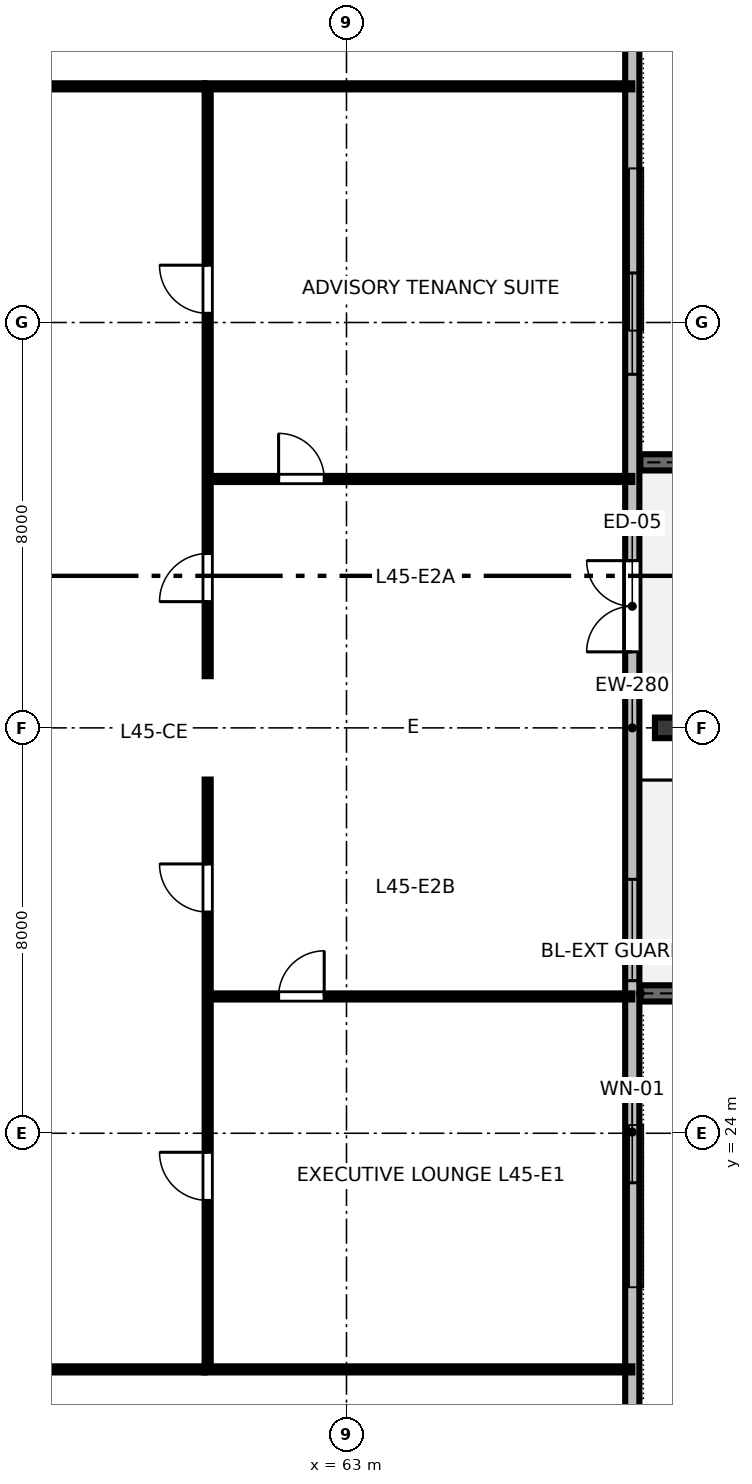
"""IFC4 building model, lengths in metres.
Left out: names, types, materials, properties, quantities, classifications, styles, units other than length and angle.
Written with IfcOpenShell. Run it as: python <this file> out.ifc"""

import sys

from ifc_helpers import new_model, si_unit, direction, frame, frame_2d, origin, origin_2d, place, context, subcontext, project, spatial, rectangle, i_section, extrude, element, fill, save


model = new_model("IFC4")
c1 = context("Model", 3, precision=1e-05, world=origin(), true_north=direction((0.0, 1.0)))
c2 = subcontext(c1, "Body", "Model", "MODEL_VIEW")
j1 = project(units=[si_unit("LENGTHUNIT", "METRE"), si_unit("PLANEANGLEUNIT", "RADIAN")], contexts=[c1])
p1 = place(None, origin())
s1 = spatial("IfcSite", under=j1, at=p1, CompositionType="ELEMENT")
p2 = place(p1, origin())
s2 = spatial("IfcBuilding", under=s1, at=p2, CompositionType="ELEMENT")
p3 = place(p2, frame((0.0, 0.0, 172.0)))
s3 = spatial("IfcBuildingStorey", under=s2, at=p3, CompositionType="ELEMENT", Elevation=172.0)
for number, where, z_axis, x_axis in (
    (1, (68.8, 26.76, 0.0), (0.0, 0.0, 1.0), (1.0, 0.0, 0.0)),
    (2, (68.8, 37.24, 0.0), (0.0, 0.0, 1.0), (1.0, 0.0, 0.0)),
):
    element("IfcWall", number, at=place(p3, frame(where, z_axis=z_axis, x_axis=x_axis)), inside=s3, PredefinedType="SHEAR", context=c2, shape_type="SweptSolid", body=[
        extrude(rectangle(XDim=4.5, YDim=0.32, at=frame_2d((2.25, 0.0))), origin(), (0.0, 0.0, 1.0), 1.55),
    ])
p4 = place(p3, frame((69.3, 32.0, 0.0), z_axis=(-0.054564800483, 0.0, 0.998510231569), x_axis=(0.998510231569, 0.0, 0.054564800483)))
e3 = element("IfcColumn", 3, at=p4, inside=s3, PredefinedType="COLUMN", context=c2, shape_type="SweptSolid", body=[
    extrude(i_section(OverallWidth=0.406, OverallDepth=0.425, WebThickness=0.033, FlangeThickness=0.052, FilletRadius=0.025, at=origin_2d()), origin(), (0.0, 0.0, 1.0), 4.765),
])
p5 = place(p3, frame((68.64, 16.94, 0.0), z_axis=(0.0, 0.0, 1.0), x_axis=(0.0, 1.0, 0.0)))
e4 = element("IfcWall", 4, at=p5, inside=s3, PredefinedType="STANDARD", context=c2, shape_type="SweptSolid", body=[
    extrude(rectangle(XDim=30.12, YDim=0.28, at=frame_2d((15.06, 0.0))), origin(), (0.0, 0.0, 1.0), 4.76),
])
p6 = place(p5, frame((16.56, 0.0, 0.0)))
e5 = element("IfcOpeningElement", 5, at=p6, cuts=e4, PredefinedType="OPENING", context=c2, shape_type="SweptSolid", body=[
    extrude(rectangle(XDim=1.8, YDim=2.2, at=frame_2d((0.9, 1.1))), frame((0.0, 0.15, 0.0), z_axis=(0.0, -1.0, 0.0), x_axis=(1.0, 0.0, 0.0)), (0.0, 0.0, 1.0), 0.3),
])
p7 = place(p5, frame((6.083, 0.0, 0.8)))
e6 = element("IfcOpeningElement", 6, at=p7, cuts=e4, PredefinedType="OPENING", context=c2, shape_type="SweptSolid", body=[
    extrude(rectangle(XDim=2.0, YDim=1.95, at=frame_2d((1.0, 0.975))), frame((0.0, 0.15, 0.0), z_axis=(0.0, -1.0, 0.0), x_axis=(1.0, 0.0, 0.0)), (0.0, 0.0, 1.0), 0.3),
])
p8 = place(p5, frame((10.071, 0.0, 0.8)))
e7 = element("IfcOpeningElement", 7, at=p8, cuts=e4, PredefinedType="OPENING", context=c2, shape_type="SweptSolid", body=[
    extrude(rectangle(XDim=2.0, YDim=1.95, at=frame_2d((1.0, 0.975))), frame((0.0, 0.15, 0.0), z_axis=(0.0, -1.0, 0.0), x_axis=(1.0, 0.0, 0.0)), (0.0, 0.0, 1.0), 0.3),
])
p9 = place(p5, frame((22.037, 0.0, 0.8)))
e8 = element("IfcOpeningElement", 8, at=p9, cuts=e4, PredefinedType="OPENING", context=c2, shape_type="SweptSolid", body=[
    extrude(rectangle(XDim=2.0, YDim=1.95, at=frame_2d((1.0, 0.975))), frame((0.0, 0.15, 0.0), z_axis=(0.0, -1.0, 0.0), x_axis=(1.0, 0.0, 0.0)), (0.0, 0.0, 1.0), 0.3),
])
p10 = place(p3, frame((31.8, 19.34, 0.0), z_axis=(0.0, 0.0, 1.0), x_axis=(1.0, 0.0, 0.0)))
e9 = element("IfcWall", 9, at=p10, inside=s3, PredefinedType="PARTITIONING", context=c2, shape_type="SweptSolid", body=[
    extrude(rectangle(XDim=28.4, YDim=0.12, at=frame_2d((14.2, 0.0))), origin(), (0.0, 0.0, 1.0), 4.04),
])
p11 = place(p10, frame((3.936, 0.0, 0.0)))
e10 = element("IfcOpeningElement", 10, at=p11, cuts=e9, PredefinedType="OPENING", context=c2, shape_type="SweptSolid", body=[
    extrude(rectangle(XDim=0.95, YDim=2.15, at=frame_2d((0.475, 1.075))), frame((0.0, 0.07, 0.0), z_axis=(0.0, -1.0, 0.0), x_axis=(1.0, 0.0, 0.0)), (0.0, 0.0, 1.0), 0.14),
])
p12 = place(p10, frame((13.558, 0.0, 0.0)))
e11 = element("IfcOpeningElement", 11, at=p12, cuts=e9, PredefinedType="OPENING", context=c2, shape_type="SweptSolid", body=[
    extrude(rectangle(XDim=0.95, YDim=2.15, at=frame_2d((0.475, 1.075))), frame((0.0, 0.07, 0.0), z_axis=(0.0, -1.0, 0.0), x_axis=(1.0, 0.0, 0.0)), (0.0, 0.0, 1.0), 0.14),
])
p13 = place(p10, frame((23.347, 0.0, 0.0)))
e12 = element("IfcOpeningElement", 12, at=p13, cuts=e9, PredefinedType="OPENING", context=c2, shape_type="SweptSolid", body=[
    extrude(rectangle(XDim=0.95, YDim=2.15, at=frame_2d((0.475, 1.075))), frame((0.0, 0.07, 0.0), z_axis=(0.0, -1.0, 0.0), x_axis=(1.0, 0.0, 0.0)), (0.0, 0.0, 1.0), 0.14),
])
p14 = place(p3, frame((31.8, 44.66, 0.0), z_axis=(0.0, 0.0, 1.0), x_axis=(1.0, 0.0, 0.0)))
e13 = element("IfcWall", 13, at=p14, inside=s3, PredefinedType="PARTITIONING", context=c2, shape_type="SweptSolid", body=[
    extrude(rectangle(XDim=28.4, YDim=0.12, at=frame_2d((14.2, 0.0))), origin(), (0.0, 0.0, 1.0), 4.04),
])
p15 = place(p14, frame((4.347, 0.0, 0.0)))
e14 = element("IfcOpeningElement", 14, at=p15, cuts=e13, PredefinedType="OPENING", context=c2, shape_type="SweptSolid", body=[
    extrude(rectangle(XDim=0.95, YDim=2.15, at=frame_2d((0.475, 1.075))), frame((0.0, 0.07, 0.0), z_axis=(0.0, -1.0, 0.0), x_axis=(1.0, 0.0, 0.0)), (0.0, 0.0, 1.0), 0.14),
])
p16 = place(p14, frame((12.055, 0.0, 0.0)))
e15 = element("IfcOpeningElement", 15, at=p16, cuts=e13, PredefinedType="OPENING", context=c2, shape_type="SweptSolid", body=[
    extrude(rectangle(XDim=0.95, YDim=2.15, at=frame_2d((0.475, 1.075))), frame((0.0, 0.07, 0.0), z_axis=(0.0, -1.0, 0.0), x_axis=(1.0, 0.0, 0.0)), (0.0, 0.0, 1.0), 0.14),
])
p17 = place(p14, frame((21.432, 0.0, 0.0)))
e16 = element("IfcOpeningElement", 16, at=p17, cuts=e13, PredefinedType="OPENING", context=c2, shape_type="SweptSolid", body=[
    extrude(rectangle(XDim=0.95, YDim=2.15, at=frame_2d((0.475, 1.075))), frame((0.0, 0.07, 0.0), z_axis=(0.0, -1.0, 0.0), x_axis=(1.0, 0.0, 0.0)), (0.0, 0.0, 1.0), 0.14),
])
p18 = place(p3, frame((60.26, 26.7, 0.0), z_axis=(0.0, 0.0, 1.0), x_axis=(1.0, 0.0, 0.0)))
e17 = element("IfcWall", 17, at=p18, inside=s3, PredefinedType="PARTITIONING", context=c2, shape_type="SweptSolid", body=[
    extrude(rectangle(XDim=8.38, YDim=0.12, at=frame_2d((4.19, 0.0))), origin(), (0.0, 0.0, 1.0), 4.04),
])
p19 = place(p18, frame((1.4, 0.0, 0.0)))
e18 = element("IfcOpeningElement", 18, at=p19, cuts=e17, PredefinedType="OPENING", context=c2, shape_type="SweptSolid", body=[
    extrude(rectangle(XDim=0.9, YDim=2.15, at=frame_2d((0.45, 1.075))), frame((0.0, 0.07, 0.0), z_axis=(0.0, -1.0, 0.0), x_axis=(1.0, 0.0, 0.0)), (0.0, 0.0, 1.0), 0.14),
])
p20 = place(p3, frame((60.26, 36.912, 0.0), z_axis=(0.0, 0.0, 1.0), x_axis=(1.0, 0.0, 0.0)))
e19 = element("IfcWall", 19, at=p20, inside=s3, PredefinedType="PARTITIONING", context=c2, shape_type="SweptSolid", body=[
    extrude(rectangle(XDim=8.38, YDim=0.12, at=frame_2d((4.19, 0.0))), origin(), (0.0, 0.0, 1.0), 4.04),
])
p21 = place(p20, frame((1.4, 0.0, 0.0)))
e20 = element("IfcOpeningElement", 20, at=p21, cuts=e19, PredefinedType="OPENING", context=c2, shape_type="SweptSolid", body=[
    extrude(rectangle(XDim=0.9, YDim=2.15, at=frame_2d((0.45, 1.075))), frame((0.0, 0.07, 0.0), z_axis=(0.0, -1.0, 0.0), x_axis=(1.0, 0.0, 0.0)), (0.0, 0.0, 1.0), 0.14),
])
p22 = place(p3, frame((60.26, 19.4, 0.0), z_axis=(0.0, 0.0, 1.0), x_axis=(0.0, 1.0, 0.0)))
e21 = element("IfcWall", 21, at=p22, inside=s3, PredefinedType="PARTITIONING", context=c2, shape_type="SweptSolid", body=[
    extrude(rectangle(XDim=11.58, YDim=0.12, at=frame_2d((5.79, 0.0))), origin(), (0.0, 0.0, 1.0), 4.04),
])
p23 = place(p22, frame((3.275, 0.0, 0.0)))
e22 = element("IfcOpeningElement", 22, at=p23, cuts=e21, PredefinedType="OPENING", context=c2, shape_type="SweptSolid", body=[
    extrude(rectangle(XDim=0.95, YDim=2.15, at=frame_2d((0.475, 1.075))), frame((0.0, 0.07, 0.0), z_axis=(0.0, -1.0, 0.0), x_axis=(1.0, 0.0, 0.0)), (0.0, 0.0, 1.0), 0.14),
])
p24 = place(p22, frame((8.965, 0.0, 0.0)))
e23 = element("IfcOpeningElement", 23, at=p24, cuts=e21, PredefinedType="OPENING", context=c2, shape_type="SweptSolid", body=[
    extrude(rectangle(XDim=0.95, YDim=2.15, at=frame_2d((0.475, 1.075))), frame((0.0, 0.07, 0.0), z_axis=(0.0, -1.0, 0.0), x_axis=(1.0, 0.0, 0.0)), (0.0, 0.0, 1.0), 0.14),
])
p25 = place(p3, frame((60.26, 33.02, 0.0), z_axis=(0.0, 0.0, 1.0), x_axis=(0.0, 1.0, 0.0)))
e24 = element("IfcWall", 24, at=p25, inside=s3, PredefinedType="PARTITIONING", context=c2, shape_type="SweptSolid", body=[
    extrude(rectangle(XDim=11.58, YDim=0.12, at=frame_2d((5.79, 0.0))), origin(), (0.0, 0.0, 1.0), 4.04),
])
p26 = place(p25, frame((1.471, 0.0, 0.0)))
e25 = element("IfcOpeningElement", 25, at=p26, cuts=e24, PredefinedType="OPENING", context=c2, shape_type="SweptSolid", body=[
    extrude(rectangle(XDim=0.95, YDim=2.15, at=frame_2d((0.475, 1.075))), frame((0.0, 0.07, 0.0), z_axis=(0.0, -1.0, 0.0), x_axis=(1.0, 0.0, 0.0)), (0.0, 0.0, 1.0), 0.14),
])
p27 = place(p25, frame((7.161, 0.0, 0.0)))
e26 = element("IfcOpeningElement", 26, at=p27, cuts=e24, PredefinedType="OPENING", context=c2, shape_type="SweptSolid", body=[
    extrude(rectangle(XDim=0.95, YDim=2.15, at=frame_2d((0.475, 1.075))), frame((0.0, 0.07, 0.0), z_axis=(0.0, -1.0, 0.0), x_axis=(1.0, 0.0, 0.0)), (0.0, 0.0, 1.0), 0.14),
])
for number, where, z_axis, x_axis in (
    (27, (60.2, 19.34, 0.0), (0.0, 0.0, 1.0), (1.0, 0.0, 0.0)),
    (28, (60.2, 44.66, 0.0), (0.0, 0.0, 1.0), (1.0, 0.0, 0.0)),
):
    element("IfcWall", number, at=place(p3, frame(where, z_axis=z_axis, x_axis=x_axis)), inside=s3, PredefinedType="PARTITIONING", context=c2, shape_type="SweptSolid", body=[
        extrude(rectangle(XDim=8.44, YDim=0.12, at=frame_2d((4.22, 0.0))), origin(), (0.0, 0.0, 1.0), 4.04),
    ])
p28 = place(p6, origin())
e29 = element("IfcDoor", 29, at=p28, inside=s3, OperationType="DOUBLE_DOOR_SINGLE_SWING", PredefinedType="DOOR", context=c2, shape_type="SweptSolid", body=[
    extrude(rectangle(XDim=1.8, YDim=2.2, at=frame_2d((0.9, 1.1))), frame((0.0, 0.025, 0.0), z_axis=(0.0, -1.0, 0.0), x_axis=(1.0, 0.0, 0.0)), (0.0, 0.0, 1.0), 0.05),
])
fill(e5, e29)
p29 = place(p7, origin())
e30 = element("IfcWindow", 30, at=p29, inside=s3, PartitioningType="SINGLE_PANEL", PredefinedType="WINDOW", context=c2, shape_type="SweptSolid", body=[
    extrude(rectangle(XDim=2.0, YDim=1.95, at=frame_2d((1.0, 0.975))), frame((0.0, 0.03, 0.0), z_axis=(0.0, -1.0, 0.0), x_axis=(1.0, 0.0, 0.0)), (0.0, 0.0, 1.0), 0.06),
])
fill(e6, e30)
p30 = place(p8, origin())
e31 = element("IfcWindow", 31, at=p30, inside=s3, PartitioningType="SINGLE_PANEL", PredefinedType="WINDOW", context=c2, shape_type="SweptSolid", body=[
    extrude(rectangle(XDim=2.0, YDim=1.95, at=frame_2d((1.0, 0.975))), frame((0.0, 0.03, 0.0), z_axis=(0.0, -1.0, 0.0), x_axis=(1.0, 0.0, 0.0)), (0.0, 0.0, 1.0), 0.06),
])
fill(e7, e31)
p31 = place(p9, origin())
e32 = element("IfcWindow", 32, at=p31, inside=s3, PartitioningType="SINGLE_PANEL", PredefinedType="WINDOW", context=c2, shape_type="SweptSolid", body=[
    extrude(rectangle(XDim=2.0, YDim=1.95, at=frame_2d((1.0, 0.975))), frame((0.0, 0.03, 0.0), z_axis=(0.0, -1.0, 0.0), x_axis=(1.0, 0.0, 0.0)), (0.0, 0.0, 1.0), 0.06),
])
fill(e8, e32)
p32 = place(p19, origin())
e33 = element("IfcDoor", 33, at=p32, inside=s3, OperationType="SINGLE_SWING_RIGHT", PredefinedType="DOOR", context=c2, shape_type="SweptSolid", body=[
    extrude(rectangle(XDim=0.9, YDim=2.15, at=frame_2d((0.45, 1.075))), frame((0.0, 0.025, 0.0), z_axis=(0.0, -1.0, 0.0), x_axis=(1.0, 0.0, 0.0)), (0.0, 0.0, 1.0), 0.05),
])
fill(e18, e33)
p33 = place(p21, origin())
e34 = element("IfcDoor", 34, at=p33, inside=s3, OperationType="SINGLE_SWING_LEFT", PredefinedType="DOOR", context=c2, shape_type="SweptSolid", body=[
    extrude(rectangle(XDim=0.9, YDim=2.15, at=frame_2d((0.45, 1.075))), frame((0.0, 0.025, 0.0), z_axis=(0.0, -1.0, 0.0), x_axis=(1.0, 0.0, 0.0)), (0.0, 0.0, 1.0), 0.05),
])
fill(e20, e34)
p34 = place(p23, origin())
e35 = element("IfcDoor", 35, at=p34, inside=s3, OperationType="SINGLE_SWING_RIGHT", PredefinedType="DOOR", context=c2, shape_type="SweptSolid", body=[
    extrude(rectangle(XDim=0.95, YDim=2.15, at=frame_2d((0.475, 1.075))), frame((0.0, 0.025, 0.0), z_axis=(0.0, -1.0, 0.0), x_axis=(1.0, 0.0, 0.0)), (0.0, 0.0, 1.0), 0.05),
])
fill(e22, e35)
p35 = place(p24, origin())
e36 = element("IfcDoor", 36, at=p35, inside=s3, OperationType="SINGLE_SWING_RIGHT", PredefinedType="DOOR", context=c2, shape_type="SweptSolid", body=[
    extrude(rectangle(XDim=0.95, YDim=2.15, at=frame_2d((0.475, 1.075))), frame((0.0, 0.025, 0.0), z_axis=(0.0, -1.0, 0.0), x_axis=(1.0, 0.0, 0.0)), (0.0, 0.0, 1.0), 0.05),
])
fill(e23, e36)
p36 = place(p26, origin())
e37 = element("IfcDoor", 37, at=p36, inside=s3, OperationType="SINGLE_SWING_LEFT", PredefinedType="DOOR", context=c2, shape_type="SweptSolid", body=[
    extrude(rectangle(XDim=0.95, YDim=2.15, at=frame_2d((0.475, 1.075))), frame((0.0, 0.025, 0.0), z_axis=(0.0, -1.0, 0.0), x_axis=(1.0, 0.0, 0.0)), (0.0, 0.0, 1.0), 0.05),
])
fill(e25, e37)
p37 = place(p27, origin())
e38 = element("IfcDoor", 38, at=p37, inside=s3, OperationType="SINGLE_SWING_RIGHT", PredefinedType="DOOR", context=c2, shape_type="SweptSolid", body=[
    extrude(rectangle(XDim=0.95, YDim=2.15, at=frame_2d((0.475, 1.075))), frame((0.0, 0.025, 0.0), z_axis=(0.0, -1.0, 0.0), x_axis=(1.0, 0.0, 0.0)), (0.0, 0.0, 1.0), 0.05),
])
fill(e26, e38)
save(model, sys.argv[1])
